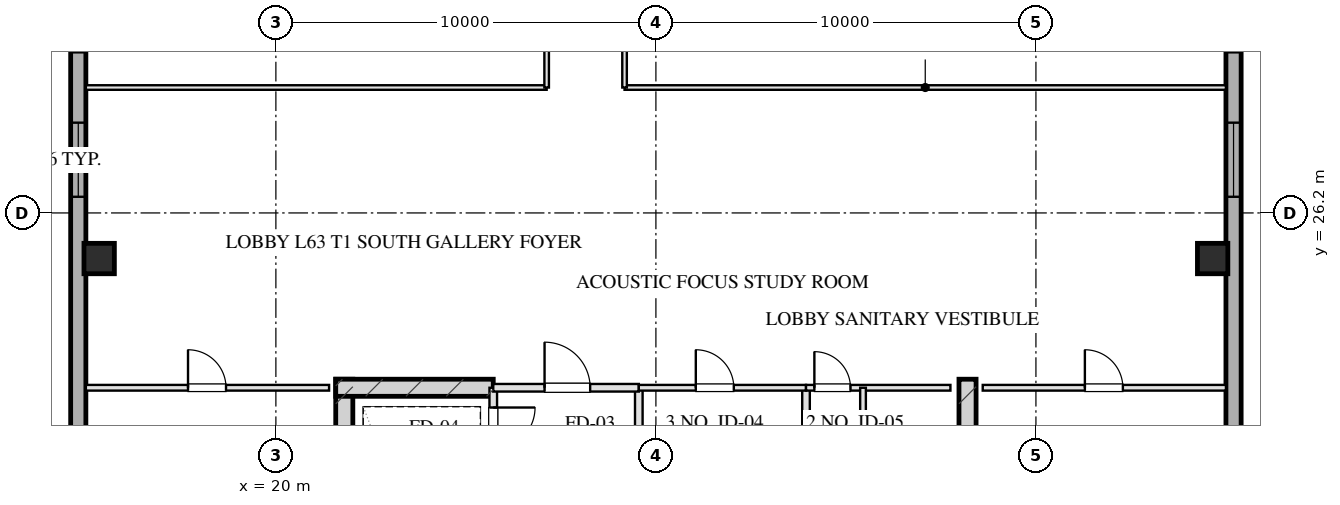
"""IFC4 building model, lengths in metres.
Left out: names, types, materials, properties, quantities, classifications, styles, units other than length and angle.
Written with IfcOpenShell. Run it as: python <this file> out.ifc"""

import sys

from ifc_helpers import new_model, si_unit, direction, frame, frame_2d, origin, origin_2d, place, context, subcontext, project, spatial, rectangle, hollow_rectangle, extrude, element, fill, save


model = new_model("IFC4")
c1 = context("Model", 3, precision=1e-05, world=origin(), true_north=direction((0.0, 1.0)))
c2 = subcontext(c1, "Body", "Model", "MODEL_VIEW")
j1 = project(units=[si_unit("LENGTHUNIT", "METRE"), si_unit("PLANEANGLEUNIT", "RADIAN")], contexts=[c1])
p1 = place(None, origin())
s1 = spatial("IfcSite", under=j1, at=p1, CompositionType="ELEMENT")
p2 = place(p1, origin())
s2 = spatial("IfcBuilding", under=s1, at=p2, CompositionType="ELEMENT")
p3 = place(p2, frame((0.0, 0.0, 234.4)))
s3 = spatial("IfcBuildingStorey", under=s2, at=p3, CompositionType="ELEMENT", Elevation=234.4)
for number, where, z_axis, x_axis in (
    (1, (21.8, 21.825, 0.0), (0.0, 0.0, 1.0), (0.0, -1.0, 0.0)),
    (2, (38.2, 21.825, 0.0), (0.0, 0.0, 1.0), (0.0, -1.0, 0.0)),
):
    element("IfcWall", number, at=place(p3, frame(where, z_axis=z_axis, x_axis=x_axis)), inside=s3, PredefinedType="SHEAR", context=c2, shape_type="SweptSolid", body=[
        extrude(rectangle(XDim=9.33, YDim=0.45, at=frame_2d((4.665, 0.0))), origin(), (0.0, 0.0, 1.0), 3.2),
    ])
p4 = place(p3, frame((21.575, 21.6, 0.0), z_axis=(0.0, 0.0, 1.0), x_axis=(1.0, 0.0, 0.0)))
e3 = element("IfcWall", 3, at=p4, inside=s3, PredefinedType="SHEAR", context=c2, shape_type="SweptSolid", body=[
    extrude(rectangle(XDim=4.145, YDim=0.45, at=frame_2d((2.073, 0.0))), origin(), (0.0, 0.0, 1.0), 3.2),
])
for number, where, z_axis, x_axis in (
    (4, (15.35, 25.0, 0.0), (0.0, 0.0, 1.0), (1.0, 0.0, 0.0)),
    (5, (44.65, 25.0, 0.0), (0.0, 0.0, 1.0), (1.0, 0.0, 0.0)),
):
    element("IfcColumn", number, at=place(p3, frame(where, z_axis=z_axis, x_axis=x_axis)), inside=s3, PredefinedType="COLUMN", context=c2, shape_type="SweptSolid", body=[
        extrude(hollow_rectangle(XDim=0.8, YDim=0.8, WallThickness=0.028, at=origin_2d()), origin(), (0.0, 0.0, 1.0), 3.201),
    ])
p5 = place(p3, frame((14.8, 13.1, 0.0), z_axis=(0.0, 0.0, 1.0), x_axis=(0.0, 1.0, 0.0)))
e6 = element("IfcWall", 6, at=p5, inside=s3, PredefinedType="SOLIDWALL", context=c2, shape_type="SweptSolid", body=[
    extrude(rectangle(XDim=41.8, YDim=0.4, at=frame_2d((20.9, 0.0))), origin(), (0.0, 0.0, 1.0), 2.36),
])
p6 = place(p5, frame((13.525, 0.0, 0.75)))
e7 = element("IfcOpeningElement", 7, at=p6, cuts=e6, PredefinedType="OPENING", context=c2, shape_type="SweptSolid", body=[
    extrude(rectangle(XDim=1.95, YDim=1.21, at=frame_2d((0.975, 0.605))), frame((0.0, 0.21, 0.0), z_axis=(0.0, -1.0, 0.0), x_axis=(1.0, 0.0, 0.0)), (0.0, 0.0, 1.0), 0.42),
])
p7 = place(p5, frame((17.325, 0.0, 0.75)))
e8 = element("IfcOpeningElement", 8, at=p7, cuts=e6, PredefinedType="OPENING", context=c2, shape_type="SweptSolid", body=[
    extrude(rectangle(XDim=1.95, YDim=1.21, at=frame_2d((0.975, 0.605))), frame((0.0, 0.21, 0.0), z_axis=(0.0, -1.0, 0.0), x_axis=(1.0, 0.0, 0.0)), (0.0, 0.0, 1.0), 0.42),
])
p8 = place(p5, frame((22.525, 0.0, 0.75)))
e9 = element("IfcOpeningElement", 9, at=p8, cuts=e6, PredefinedType="OPENING", context=c2, shape_type="SweptSolid", body=[
    extrude(rectangle(XDim=1.95, YDim=1.21, at=frame_2d((0.975, 0.605))), frame((0.0, 0.21, 0.0), z_axis=(0.0, -1.0, 0.0), x_axis=(1.0, 0.0, 0.0)), (0.0, 0.0, 1.0), 0.42),
])
p9 = place(p5, frame((26.325, 0.0, 0.75)))
e10 = element("IfcOpeningElement", 10, at=p9, cuts=e6, PredefinedType="OPENING", context=c2, shape_type="SweptSolid", body=[
    extrude(rectangle(XDim=1.95, YDim=1.21, at=frame_2d((0.975, 0.605))), frame((0.0, 0.21, 0.0), z_axis=(0.0, -1.0, 0.0), x_axis=(1.0, 0.0, 0.0)), (0.0, 0.0, 1.0), 0.42),
])
p10 = place(p3, frame((45.2, 54.9, 0.0), z_axis=(0.0, 0.0, 1.0), x_axis=(0.0, -1.0, 0.0)))
e11 = element("IfcWall", 11, at=p10, inside=s3, PredefinedType="SOLIDWALL", context=c2, shape_type="SweptSolid", body=[
    extrude(rectangle(XDim=41.8, YDim=0.4, at=frame_2d((20.9, 0.0))), origin(), (0.0, 0.0, 1.0), 2.36),
])
p11 = place(p10, frame((26.325, 0.0, 0.75)))
e12 = element("IfcOpeningElement", 12, at=p11, cuts=e11, PredefinedType="OPENING", context=c2, shape_type="SweptSolid", body=[
    extrude(rectangle(XDim=1.95, YDim=1.21, at=frame_2d((0.975, 0.605))), frame((0.0, 0.21, 0.0), z_axis=(0.0, -1.0, 0.0), x_axis=(1.0, 0.0, 0.0)), (0.0, 0.0, 1.0), 0.42),
])
p12 = place(p10, frame((22.525, 0.0, 0.75)))
e13 = element("IfcOpeningElement", 13, at=p12, cuts=e11, PredefinedType="OPENING", context=c2, shape_type="SweptSolid", body=[
    extrude(rectangle(XDim=1.95, YDim=1.21, at=frame_2d((0.975, 0.605))), frame((0.0, 0.21, 0.0), z_axis=(0.0, -1.0, 0.0), x_axis=(1.0, 0.0, 0.0)), (0.0, 0.0, 1.0), 0.42),
])
p13 = place(p10, frame((17.325, 0.0, 0.75)))
e14 = element("IfcOpeningElement", 14, at=p13, cuts=e11, PredefinedType="OPENING", context=c2, shape_type="SweptSolid", body=[
    extrude(rectangle(XDim=1.95, YDim=1.21, at=frame_2d((0.975, 0.605))), frame((0.0, 0.21, 0.0), z_axis=(0.0, -1.0, 0.0), x_axis=(1.0, 0.0, 0.0)), (0.0, 0.0, 1.0), 0.42),
])
p14 = place(p10, frame((13.525, 0.0, 0.75)))
e15 = element("IfcOpeningElement", 15, at=p14, cuts=e11, PredefinedType="OPENING", context=c2, shape_type="SweptSolid", body=[
    extrude(rectangle(XDim=1.95, YDim=1.21, at=frame_2d((0.975, 0.605))), frame((0.0, 0.21, 0.0), z_axis=(0.0, -1.0, 0.0), x_axis=(1.0, 0.0, 0.0)), (0.0, 0.0, 1.0), 0.42),
])
p15 = place(p3, frame((25.72, 21.6, 0.0), z_axis=(0.0, 0.0, 1.0), x_axis=(0.0, -1.0, 0.0)))
e16 = element("IfcWall", 16, at=p15, inside=s3, PredefinedType="PARTITIONING", context=c2, shape_type="SweptSolid", body=[
    extrude(rectangle(XDim=1.9, YDim=0.2, at=frame_2d((0.95, 0.0))), origin(), (0.0, 0.0, 1.0), 2.925),
])
p16 = place(p15, frame((0.52, 0.0, 0.0)))
e17 = element("IfcOpeningElement", 17, at=p16, cuts=e16, PredefinedType="OPENING", context=c2, shape_type="SweptSolid", body=[
    extrude(rectangle(XDim=1.1, YDim=2.05, at=frame_2d((0.55, 1.025))), frame((0.0, 0.11, 0.0), z_axis=(0.0, -1.0, 0.0), x_axis=(1.0, 0.0, 0.0)), (0.0, 0.0, 1.0), 0.22),
])
p17 = place(p3, frame((29.55, 21.6, 0.0), z_axis=(0.0, 0.0, 1.0), x_axis=(0.0, -1.0, 0.0)))
e18 = element("IfcWall", 18, at=p17, inside=s3, PredefinedType="PARTITIONING", context=c2, shape_type="SweptSolid", body=[
    extrude(rectangle(XDim=8.43, YDim=0.2, at=frame_2d((4.215, 0.0))), origin(), (0.0, 0.0, 1.0), 2.925),
])
p18 = place(p3, frame((25.72, 21.6, 0.0), z_axis=(0.0, 0.0, 1.0), x_axis=(1.0, 0.0, 0.0)))
e19 = element("IfcWall", 19, at=p18, inside=s3, PredefinedType="PARTITIONING", context=c2, shape_type="SweptSolid", body=[
    extrude(rectangle(XDim=3.83, YDim=0.2, at=frame_2d((1.915, 0.0))), origin(), (0.0, 0.0, 1.0), 2.925),
])
p19 = place(p18, frame((1.35, 0.0, 0.0)))
e20 = element("IfcOpeningElement", 20, at=p19, cuts=e19, PredefinedType="OPENING", context=c2, shape_type="SweptSolid", body=[
    extrude(rectangle(XDim=1.2, YDim=2.05, at=frame_2d((0.6, 1.025))), frame((0.0, 0.11, 0.0), z_axis=(0.0, -1.0, 0.0), x_axis=(1.0, 0.0, 0.0)), (0.0, 0.0, 1.0), 0.22),
])
p20 = place(p3, frame((33.95, 21.6, 0.0), z_axis=(0.0, 0.0, 1.0), x_axis=(0.0, -1.0, 0.0)))
e21 = element("IfcWall", 21, at=p20, inside=s3, PredefinedType="PARTITIONING", context=c2, shape_type="SweptSolid", body=[
    extrude(rectangle(XDim=8.43, YDim=0.2, at=frame_2d((4.215, 0.0))), origin(), (0.0, 0.0, 1.0), 2.925),
])
p21 = place(p3, frame((29.55, 21.6, 0.0), z_axis=(0.0, 0.0, 1.0), x_axis=(1.0, 0.0, 0.0)))
e22 = element("IfcWall", 22, at=p21, inside=s3, PredefinedType="PARTITIONING", context=c2, shape_type="SweptSolid", body=[
    extrude(rectangle(XDim=4.4, YDim=0.15, at=frame_2d((2.2, 0.0))), origin(), (0.0, 0.0, 1.0), 2.925),
])
p22 = place(p21, frame((1.5, 0.0, 0.0)))
e23 = element("IfcOpeningElement", 23, at=p22, cuts=e22, PredefinedType="OPENING", context=c2, shape_type="SweptSolid", body=[
    extrude(rectangle(XDim=1.0, YDim=2.05, at=frame_2d((0.5, 1.025))), frame((0.0, 0.085, 0.0), z_axis=(0.0, -1.0, 0.0), x_axis=(1.0, 0.0, 0.0)), (0.0, 0.0, 1.0), 0.17),
])
p23 = place(p3, frame((33.95, 21.6, 0.0), z_axis=(0.0, 0.0, 1.0), x_axis=(1.0, 0.0, 0.0)))
e24 = element("IfcWall", 24, at=p23, inside=s3, PredefinedType="PARTITIONING", context=c2, shape_type="SweptSolid", body=[
    extrude(rectangle(XDim=3.8, YDim=0.15, at=frame_2d((1.9, 0.0))), origin(), (0.0, 0.0, 1.0), 2.925),
])
p24 = place(p23, frame((0.22, 0.0, 0.0)))
e25 = element("IfcOpeningElement", 25, at=p24, cuts=e24, PredefinedType="OPENING", context=c2, shape_type="SweptSolid", body=[
    extrude(rectangle(XDim=0.95, YDim=2.05, at=frame_2d((0.475, 1.025))), frame((0.0, 0.085, 0.0), z_axis=(0.0, -1.0, 0.0), x_axis=(1.0, 0.0, 0.0)), (0.0, 0.0, 1.0), 0.17),
])
p25 = place(p3, frame((35.45, 21.6, 0.0), z_axis=(0.0, 0.0, 1.0), x_axis=(0.0, -1.0, 0.0)))
e26 = element("IfcWall", 26, at=p25, inside=s3, PredefinedType="PARTITIONING", context=c2, shape_type="SweptSolid", body=[
    extrude(rectangle(XDim=8.43, YDim=0.15, at=frame_2d((4.215, 0.0))), origin(), (0.0, 0.0, 1.0), 2.565),
])
p26 = place(p25, frame((2.55, 0.0, 0.0)))
e27 = element("IfcOpeningElement", 27, at=p26, cuts=e26, PredefinedType="OPENING", context=c2, shape_type="SweptSolid", body=[
    extrude(rectangle(XDim=0.95, YDim=2.05, at=frame_2d((0.475, 1.025))), frame((0.0, 0.085, 0.0), z_axis=(0.0, -1.0, 0.0), x_axis=(1.0, 0.0, 0.0)), (0.0, 0.0, 1.0), 0.17),
])
p27 = place(p25, frame((4.7, 0.0, 0.0)))
e28 = element("IfcOpeningElement", 28, at=p27, cuts=e26, PredefinedType="OPENING", context=c2, shape_type="SweptSolid", body=[
    extrude(rectangle(XDim=0.9, YDim=2.05, at=frame_2d((0.45, 1.025))), frame((0.0, 0.085, 0.0), z_axis=(0.0, -1.0, 0.0), x_axis=(1.0, 0.0, 0.0)), (0.0, 0.0, 1.0), 0.17),
])
p28 = place(p25, frame((6.8, 0.0, 0.0)))
e29 = element("IfcOpeningElement", 29, at=p28, cuts=e26, PredefinedType="OPENING", context=c2, shape_type="SweptSolid", body=[
    extrude(rectangle(XDim=0.9, YDim=2.05, at=frame_2d((0.45, 1.025))), frame((0.0, 0.085, 0.0), z_axis=(0.0, -1.0, 0.0), x_axis=(1.0, 0.0, 0.0)), (0.0, 0.0, 1.0), 0.17),
])
p29 = place(p3, frame((15.0, 21.6, 0.0), z_axis=(0.0, 0.0, 1.0), x_axis=(1.0, 0.0, 0.0)))
e30 = element("IfcWall", 30, at=p29, inside=s3, PredefinedType="PARTITIONING", context=c2, shape_type="SweptSolid", body=[
    extrude(rectangle(XDim=6.4, YDim=0.15, at=frame_2d((3.2, 0.0))), origin(), (0.0, 0.0, 1.0), 2.925),
])
p30 = place(p29, frame((2.688, 0.0, 0.0)))
e31 = element("IfcOpeningElement", 31, at=p30, cuts=e30, PredefinedType="OPENING", context=c2, shape_type="SweptSolid", body=[
    extrude(rectangle(XDim=1.0, YDim=2.05, at=frame_2d((0.5, 1.025))), frame((0.0, 0.085, 0.0), z_axis=(0.0, -1.0, 0.0), x_axis=(1.0, 0.0, 0.0)), (0.0, 0.0, 1.0), 0.17),
])
p31 = place(p3, frame((38.6, 21.6, 0.0), z_axis=(0.0, 0.0, 1.0), x_axis=(1.0, 0.0, 0.0)))
e32 = element("IfcWall", 32, at=p31, inside=s3, PredefinedType="PARTITIONING", context=c2, shape_type="SweptSolid", body=[
    extrude(rectangle(XDim=6.4, YDim=0.15, at=frame_2d((3.2, 0.0))), origin(), (0.0, 0.0, 1.0), 2.925),
])
p32 = place(p31, frame((2.688, 0.0, 0.0)))
e33 = element("IfcOpeningElement", 33, at=p32, cuts=e32, PredefinedType="OPENING", context=c2, shape_type="SweptSolid", body=[
    extrude(rectangle(XDim=1.0, YDim=2.05, at=frame_2d((0.5, 1.025))), frame((0.0, 0.085, 0.0), z_axis=(0.0, -1.0, 0.0), x_axis=(1.0, 0.0, 0.0)), (0.0, 0.0, 1.0), 0.17),
])
p33 = place(p3, frame((15.0, 29.5, 0.0), z_axis=(0.0, 0.0, 1.0), x_axis=(1.0, 0.0, 0.0)))
e34 = element("IfcWall", 34, at=p33, inside=s3, PredefinedType="PARTITIONING", context=c2, shape_type="SweptSolid", body=[
    extrude(rectangle(XDim=12.125, YDim=0.12, at=frame_2d((6.062, 0.0))), origin(), (0.0, 0.0, 1.0), 2.925),
])
p34 = place(p3, frame((29.175, 29.5, 0.0), z_axis=(0.0, 0.0, 1.0), x_axis=(1.0, 0.0, 0.0)))
e35 = element("IfcWall", 35, at=p34, inside=s3, PredefinedType="PARTITIONING", context=c2, shape_type="SweptSolid", body=[
    extrude(rectangle(XDim=15.825, YDim=0.12, at=frame_2d((7.913, 0.0))), origin(), (0.0, 0.0, 1.0), 2.925),
])
p35 = place(p3, frame((27.125, 29.5, 0.0), z_axis=(0.0, 0.0, 1.0), x_axis=(0.0, 1.0, 0.0)))
e36 = element("IfcWall", 36, at=p35, inside=s3, PredefinedType="PARTITIONING", context=c2, shape_type="SweptSolid", body=[
    extrude(rectangle(XDim=9.0, YDim=0.12, at=frame_2d((4.5, 0.0))), origin(), (0.0, 0.0, 1.0), 2.925),
])
p36 = place(p35, frame((2.335, 0.0, 0.0)))
e37 = element("IfcOpeningElement", 37, at=p36, cuts=e36, PredefinedType="OPENING", context=c2, shape_type="SweptSolid", body=[
    extrude(rectangle(XDim=0.85, YDim=2.05, at=frame_2d((0.425, 1.025))), frame((0.0, 0.07, 0.0), z_axis=(0.0, -1.0, 0.0), x_axis=(1.0, 0.0, 0.0)), (0.0, 0.0, 1.0), 0.14),
])
p37 = place(p35, frame((6.835, 0.0, 0.0)))
e38 = element("IfcOpeningElement", 38, at=p37, cuts=e36, PredefinedType="OPENING", context=c2, shape_type="SweptSolid", body=[
    extrude(rectangle(XDim=1.0, YDim=2.05, at=frame_2d((0.5, 1.025))), frame((0.0, 0.07, 0.0), z_axis=(0.0, -1.0, 0.0), x_axis=(1.0, 0.0, 0.0)), (0.0, 0.0, 1.0), 0.14),
])
p38 = place(p3, frame((29.175, 29.5, 0.0), z_axis=(0.0, 0.0, 1.0), x_axis=(0.0, 1.0, 0.0)))
e39 = element("IfcWall", 39, at=p38, inside=s3, PredefinedType="PARTITIONING", context=c2, shape_type="SweptSolid", body=[
    extrude(rectangle(XDim=9.0, YDim=0.12, at=frame_2d((4.5, 0.0))), origin(), (0.0, 0.0, 1.0), 2.925),
])
p39 = place(p38, frame((1.165, 0.0, 0.0)))
e40 = element("IfcOpeningElement", 40, at=p39, cuts=e39, PredefinedType="OPENING", context=c2, shape_type="SweptSolid", body=[
    extrude(rectangle(XDim=1.0, YDim=2.05, at=frame_2d((0.5, 1.025))), frame((0.0, 0.07, 0.0), z_axis=(0.0, -1.0, 0.0), x_axis=(1.0, 0.0, 0.0)), (0.0, 0.0, 1.0), 0.14),
])
p40 = place(p38, frame((4.0, 0.0, 0.0)))
e41 = element("IfcOpeningElement", 41, at=p40, cuts=e39, PredefinedType="OPENING", context=c2, shape_type="SweptSolid", body=[
    extrude(rectangle(XDim=1.0, YDim=2.05, at=frame_2d((0.5, 1.025))), frame((0.0, 0.07, 0.0), z_axis=(0.0, -1.0, 0.0), x_axis=(1.0, 0.0, 0.0)), (0.0, 0.0, 1.0), 0.14),
])
p41 = place(p38, frame((6.835, 0.0, 0.0)))
e42 = element("IfcOpeningElement", 42, at=p41, cuts=e39, PredefinedType="OPENING", context=c2, shape_type="SweptSolid", body=[
    extrude(rectangle(XDim=1.0, YDim=2.05, at=frame_2d((0.5, 1.025))), frame((0.0, 0.07, 0.0), z_axis=(0.0, -1.0, 0.0), x_axis=(1.0, 0.0, 0.0)), (0.0, 0.0, 1.0), 0.14),
])
p42 = place(p6, origin())
e43 = element("IfcWindow", 43, at=p42, inside=s3, PartitioningType="TRIPLE_PANEL_VERTICAL", PredefinedType="WINDOW", context=c2, shape_type="SweptSolid", body=[
    extrude(rectangle(XDim=1.95, YDim=1.21, at=frame_2d((0.975, 0.605))), frame((0.0, 0.03, 0.0), z_axis=(0.0, -1.0, 0.0), x_axis=(1.0, 0.0, 0.0)), (0.0, 0.0, 1.0), 0.06),
])
fill(e7, e43)
p43 = place(p11, origin())
e44 = element("IfcWindow", 44, at=p43, inside=s3, PartitioningType="TRIPLE_PANEL_VERTICAL", PredefinedType="WINDOW", context=c2, shape_type="SweptSolid", body=[
    extrude(rectangle(XDim=1.95, YDim=1.21, at=frame_2d((0.975, 0.605))), frame((0.0, 0.03, 0.0), z_axis=(0.0, -1.0, 0.0), x_axis=(1.0, 0.0, 0.0)), (0.0, 0.0, 1.0), 0.06),
])
fill(e12, e44)
p44 = place(p16, origin())
e45 = element("IfcDoor", 45, at=p44, inside=s3, OperationType="SINGLE_SWING_LEFT", PredefinedType="DOOR", context=c2, shape_type="SweptSolid", body=[
    extrude(rectangle(XDim=1.1, YDim=2.05, at=frame_2d((0.55, 1.025))), frame((0.0, 0.025, 0.0), z_axis=(0.0, -1.0, 0.0), x_axis=(1.0, 0.0, 0.0)), (0.0, 0.0, 1.0), 0.05),
])
fill(e17, e45)
p45 = place(p19, origin())
e46 = element("IfcDoor", 46, at=p45, inside=s3, OperationType="SINGLE_SWING_LEFT", PredefinedType="DOOR", context=c2, shape_type="SweptSolid", body=[
    extrude(rectangle(XDim=1.2, YDim=2.05, at=frame_2d((0.6, 1.025))), frame((0.0, 0.025, 0.0), z_axis=(0.0, -1.0, 0.0), x_axis=(1.0, 0.0, 0.0)), (0.0, 0.0, 1.0), 0.05),
])
fill(e20, e46)
p46 = place(p22, origin())
e47 = element("IfcDoor", 47, at=p46, inside=s3, OperationType="SINGLE_SWING_LEFT", PredefinedType="DOOR", context=c2, shape_type="SweptSolid", body=[
    extrude(rectangle(XDim=1.0, YDim=2.05, at=frame_2d((0.5, 1.025))), frame((0.0, 0.025, 0.0), z_axis=(0.0, -1.0, 0.0), x_axis=(1.0, 0.0, 0.0)), (0.0, 0.0, 1.0), 0.05),
])
fill(e23, e47)
p47 = place(p24, origin())
e48 = element("IfcDoor", 48, at=p47, inside=s3, OperationType="SINGLE_SWING_LEFT", PredefinedType="DOOR", context=c2, shape_type="SweptSolid", body=[
    extrude(rectangle(XDim=0.95, YDim=2.05, at=frame_2d((0.475, 1.025))), frame((0.0, 0.025, 0.0), z_axis=(0.0, -1.0, 0.0), x_axis=(1.0, 0.0, 0.0)), (0.0, 0.0, 1.0), 0.05),
])
fill(e25, e48)
p48 = place(p30, origin())
e49 = element("IfcDoor", 49, at=p48, inside=s3, OperationType="SINGLE_SWING_LEFT", PredefinedType="DOOR", context=c2, shape_type="SweptSolid", body=[
    extrude(rectangle(XDim=1.0, YDim=2.05, at=frame_2d((0.5, 1.025))), frame((0.0, 0.025, 0.0), z_axis=(0.0, -1.0, 0.0), x_axis=(1.0, 0.0, 0.0)), (0.0, 0.0, 1.0), 0.05),
])
fill(e31, e49)
p49 = place(p32, origin())
e50 = element("IfcDoor", 50, at=p49, inside=s3, OperationType="SINGLE_SWING_LEFT", PredefinedType="DOOR", context=c2, shape_type="SweptSolid", body=[
    extrude(rectangle(XDim=1.0, YDim=2.05, at=frame_2d((0.5, 1.025))), frame((0.0, 0.025, 0.0), z_axis=(0.0, -1.0, 0.0), x_axis=(1.0, 0.0, 0.0)), (0.0, 0.0, 1.0), 0.05),
])
fill(e33, e50)
save(model, sys.argv[1])
